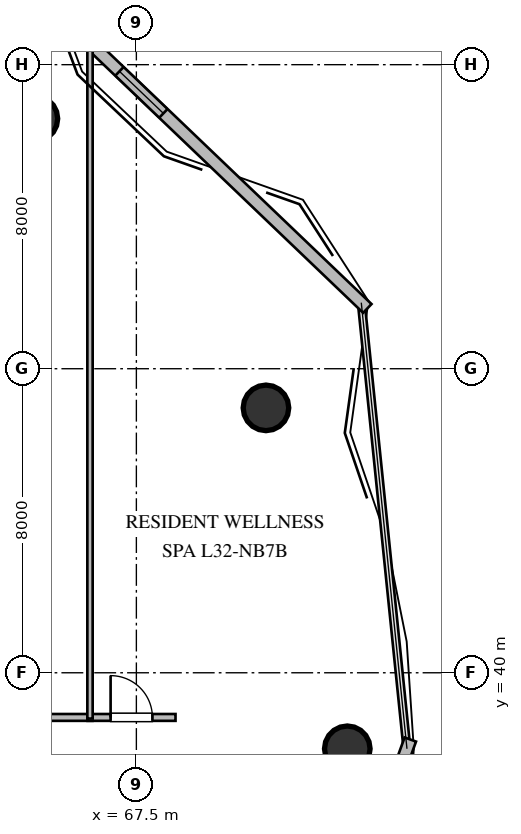
"""IFC4 building model, lengths in metres.
Left out: names, types, materials, properties, quantities, classifications, styles, units other than length and angle.
Written with IfcOpenShell. Run it as: python <this file> out.ifc"""

import sys

from ifc_helpers import new_model, si_unit, direction, frame, frame_2d, origin, origin_2d, place, context, subcontext, project, spatial, rectangle, circle, extrude, element, fill, save


model = new_model("IFC4")
c1 = context("Model", 3, precision=1e-05, world=origin(), true_north=direction((0.0, 1.0)))
c2 = subcontext(c1, "Body", "Model", "MODEL_VIEW")
j1 = project(units=[si_unit("LENGTHUNIT", "METRE"), si_unit("PLANEANGLEUNIT", "RADIAN")], contexts=[c1])
p1 = place(None, origin())
s1 = spatial("IfcSite", under=j1, at=p1, CompositionType="ELEMENT")
p2 = place(p1, origin())
s2 = spatial("IfcBuilding", under=s1, at=p2, CompositionType="ELEMENT")
p3 = place(p2, frame((0.0, 0.0, 124.2)))
s3 = spatial("IfcBuildingStorey", under=s2, at=p3, CompositionType="ELEMENT", Elevation=124.2)
for number, where, z_axis, x_axis in (
    (1, (73.05, 38.0, 0.0), (0.0, 0.0, 1.0), (1.0, 0.0, 0.0)),
    (2, (70.91, 46.97, 0.0), (0.0, 0.0, 1.0), (1.0, 0.0, 0.0)),
    (3, (64.83, 54.58, 0.0), (0.0, 0.0, 1.0), (1.0, 0.0, 0.0)),
):
    element("IfcColumn", number, at=place(p3, frame(where, z_axis=z_axis, x_axis=x_axis)), inside=s3, PredefinedType="COLUMN", context=c2, shape_type="SweptSolid", body=[
        extrude(circle(Radius=0.6, at=origin_2d()), origin(), (0.0, 0.0, 1.0), 3.6),
    ])
p4 = place(p3, frame((74.708, 38.244, 0.0), z_axis=(0.0, 0.0, 1.0), x_axis=(-0.340324669139, -0.94030799187, 0.0)))
e4 = element("IfcWall", 4, at=p4, inside=s3, PredefinedType="STANDARD", context=c2, shape_type="SweptSolid", body=[
    extrude(rectangle(XDim=13.81, YDim=0.32, at=frame_2d((6.905, 0.0))), origin(), (0.0, 0.0, 1.0), 3.36),
])
p5 = place(p3, frame((61.689, 60.957, 0.0), z_axis=(0.0, 0.0, 1.0), x_axis=(0.722641212534, -0.691223319881, 0.0)))
e5 = element("IfcWall", 5, at=p5, inside=s3, PredefinedType="STANDARD", context=c2, shape_type="SweptSolid", body=[
    extrude(rectangle(XDim=16.451, YDim=0.32, at=frame_2d((8.225, 0.0))), origin(), (0.0, 0.0, 1.0), 3.36),
])
p6 = place(p5, frame((7.425, 0.0, 1.05)))
e6 = element("IfcOpeningElement", 6, at=p6, cuts=e5, PredefinedType="OPENING", context=c2, shape_type="SweptSolid", body=[
    extrude(rectangle(XDim=1.6, YDim=1.5, at=frame_2d((0.8, 0.75))), frame((0.0, 0.17, 0.0), z_axis=(0.0, -1.0, 0.0), x_axis=(1.0, 0.0, 0.0)), (0.0, 0.0, 1.0), 0.34),
])
p7 = place(p3, frame((57.935, 38.825, 0.0), z_axis=(0.0, 0.0, 1.0), x_axis=(1.0, 0.0, 0.0)))
e7 = element("IfcWall", 7, at=p7, inside=s3, PredefinedType="PARTITIONING", context=c2, shape_type="SweptSolid", body=[
    extrude(rectangle(XDim=8.41, YDim=0.18, at=frame_2d((4.205, 0.0))), origin(), (0.0, 0.0, 1.0), 3.36),
])
p8 = place(p7, frame((3.655, 0.0, 0.0)))
e8 = element("IfcOpeningElement", 8, at=p8, cuts=e7, PredefinedType="OPENING", context=c2, shape_type="SweptSolid", body=[
    extrude(rectangle(XDim=1.1, YDim=2.1, at=frame_2d((0.55, 1.05))), frame((0.0, 0.1, 0.0), z_axis=(0.0, -1.0, 0.0), x_axis=(1.0, 0.0, 0.0)), (0.0, 0.0, 1.0), 0.2),
])
p9 = place(p3, frame((66.215, 38.825, 0.0), z_axis=(0.0, 0.0, 1.0), x_axis=(1.0, 0.0, 0.0)))
e9 = element("IfcWall", 9, at=p9, inside=s3, PredefinedType="PARTITIONING", context=c2, shape_type="SweptSolid", body=[
    extrude(rectangle(XDim=2.315, YDim=0.18, at=frame_2d((1.157, 0.0))), origin(), (0.0, 0.0, 1.0), 3.36),
])
p10 = place(p9, frame((0.607, 0.0, 0.0)))
e10 = element("IfcOpeningElement", 10, at=p10, cuts=e9, PredefinedType="OPENING", context=c2, shape_type="SweptSolid", body=[
    extrude(rectangle(XDim=1.1, YDim=2.1, at=frame_2d((0.55, 1.05))), frame((0.0, 0.1, 0.0), z_axis=(0.0, -1.0, 0.0), x_axis=(1.0, 0.0, 0.0)), (0.0, 0.0, 1.0), 0.2),
])
p11 = place(p3, frame((66.28, 56.556, 0.0), z_axis=(0.0, 0.0, 1.0), x_axis=(0.0, -1.0, 0.0)))
e11 = element("IfcWall", 11, at=p11, inside=s3, PredefinedType="PARTITIONING", context=c2, shape_type="SweptSolid", body=[
    extrude(rectangle(XDim=17.761, YDim=0.14, at=frame_2d((8.88, 0.0))), origin(), (0.0, 0.0, 1.0), 3.36),
])
p12 = place(p6, origin())
e12 = element("IfcWindow", 12, at=p12, inside=s3, PartitioningType="SINGLE_PANEL", PredefinedType="WINDOW", context=c2, shape_type="SweptSolid", body=[
    extrude(rectangle(XDim=1.6, YDim=1.5, at=frame_2d((0.8, 0.75))), frame((0.0, 0.03, 0.0), z_axis=(0.0, -1.0, 0.0), x_axis=(1.0, 0.0, 0.0)), (0.0, 0.0, 1.0), 0.06),
])
fill(e6, e12)
p13 = place(p10, origin())
e13 = element("IfcDoor", 13, at=p13, inside=s3, OperationType="SINGLE_SWING_LEFT", PredefinedType="DOOR", context=c2, shape_type="SweptSolid", body=[
    extrude(rectangle(XDim=1.1, YDim=2.1, at=frame_2d((0.55, 1.05))), frame((0.0, 0.025, 0.0), z_axis=(0.0, -1.0, 0.0), x_axis=(1.0, 0.0, 0.0)), (0.0, 0.0, 1.0), 0.05),
])
fill(e10, e13)
save(model, sys.argv[1])
